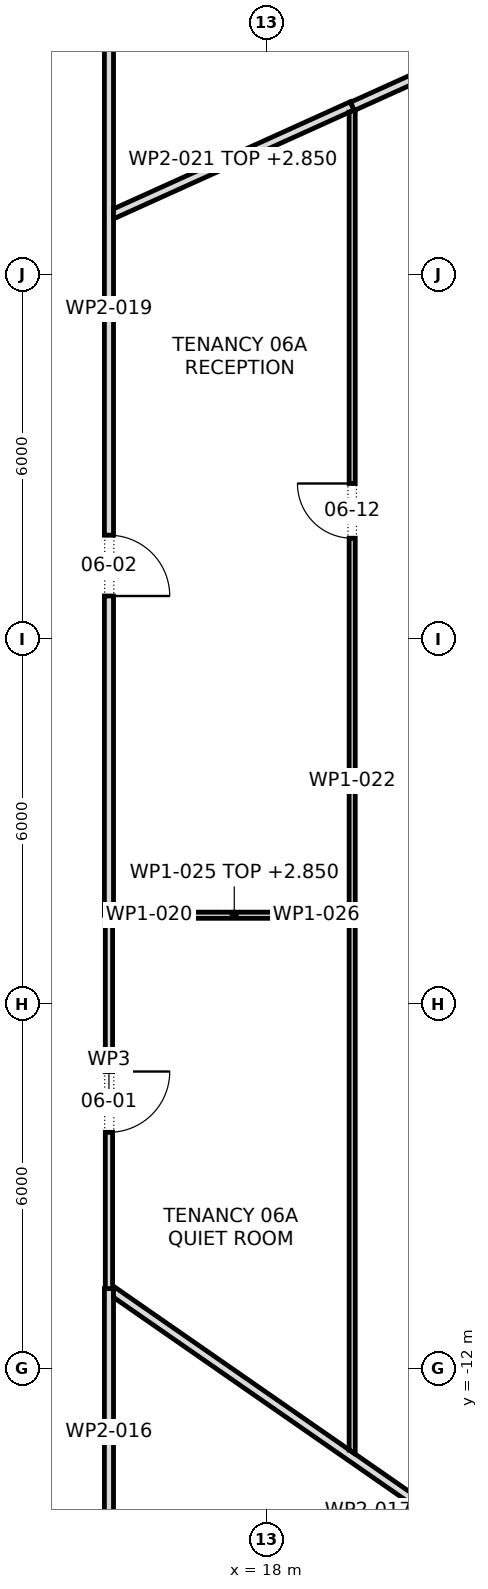
"""IFC4 building model, lengths in metres.
Left out: names, types, materials, properties, quantities, classifications, styles, units other than length and angle.
Written with IfcOpenShell. Run it as: python <this file> out.ifc"""

import sys

from ifc_helpers import new_model, si_unit, direction, frame, frame_2d, origin, place, context, subcontext, project, spatial, polyline, rectangle, outline, extrude, element, fill, save


model = new_model("IFC4")
c1 = context("Model", 3, precision=1e-05, world=origin(), true_north=direction((0.0, 1.0)))
c2 = subcontext(c1, "Body", "Model", "MODEL_VIEW")
j1 = project(units=[si_unit("LENGTHUNIT", "METRE"), si_unit("PLANEANGLEUNIT", "RADIAN")], contexts=[c1])
p1 = place(None, origin())
s1 = spatial("IfcSite", under=j1, at=p1, CompositionType="ELEMENT")
p2 = place(p1, origin())
s2 = spatial("IfcBuilding", under=s1, at=p2, CompositionType="ELEMENT")
p3 = place(p2, frame((0.0, 0.0, 86.5)))
s3 = spatial("IfcBuildingStorey", under=s2, at=p3, CompositionType="ELEMENT", Elevation=86.5)
p4 = place(p3, frame((15.4, -10.68, 0.0), z_axis=(0.0, 0.0, 1.0), x_axis=(0.0, -1.0, 0.0)))
e1 = element("IfcWall", 1, at=p4, inside=s3, PredefinedType="PARTITIONING", context=c2, shape_type="SweptSolid", body=[
    extrude(outline(polyline([(0.0, -0.075), (1.548, -0.075), (3.097, -0.075), (4.645, -0.075), (4.795, 0.075), (3.197, 0.075), (1.598, 0.075), (0.0, 0.075), (0.0, -0.075)])), origin(), (0.0, 0.0, 1.0), 3.9),
])
p5 = place(p3, frame((15.418, -10.692, 0.0), z_axis=(0.0, 0.0, 1.0), x_axis=(0.821423906774, -0.57031812647, 0.0)))
e2 = element("IfcWall", 2, at=p5, inside=s3, PredefinedType="PARTITIONING", context=c2, shape_type="SweptSolid", body=[
    extrude(outline(polyline([(0.122, -0.075), (1.922, -0.075), (3.722, -0.075), (5.522, -0.075), (7.322, -0.075), (9.122, -0.075), (10.922, -0.075), (12.722, -0.075), (12.722, -0.074), (12.722, 0.075), (10.727, 0.075), (8.732, 0.075), (6.737, 0.075), (4.741, 0.075), (4.737, 0.072), (4.735, 0.075), (3.157, 0.075), (1.578, 0.075), (0.0, 0.075), (0.0, 0.074), (0.028, 0.034), (0.04, 0.043), (0.122, -0.075)])), origin(), (0.0, 0.0, 1.0), 2.86),
])
p6 = place(p3, frame((15.4, -4.54, 0.0), z_axis=(0.0, 0.0, 1.0), x_axis=(0.0, -1.0, 0.0)))
e3 = element("IfcWall", 3, at=p6, inside=s3, PredefinedType="PARTITIONING", context=c2, shape_type="SweptSolid", body=[
    extrude(rectangle(XDim=6.14, YDim=0.12, at=frame_2d((3.07, 0.0))), origin(), (0.0, 0.0, 1.0), 3.9),
])
p7 = place(p6, frame((2.57, 0.0, 0.0)))
e4 = element("IfcOpeningElement", 4, at=p7, cuts=e3, PredefinedType="OPENING", context=c2, shape_type="SweptSolid", body=[
    extrude(rectangle(XDim=1.0, YDim=2.1, at=frame_2d((0.5, 1.05))), frame((0.0, 0.072, 0.0), z_axis=(0.0, -1.0, 0.0), x_axis=(1.0, 0.0, 0.0)), (0.0, 0.0, 1.0), 0.144),
])
p8 = place(p3, frame((15.4, -4.54, 0.0), z_axis=(0.0, 0.0, 1.0), x_axis=(0.0, 1.0, 0.0)))
e5 = element("IfcWall", 5, at=p8, inside=s3, PredefinedType="PARTITIONING", context=c2, shape_type="SweptSolid", body=[
    extrude(outline(polyline([(0.0, -0.075), (1.82, -0.075), (3.639, -0.075), (5.458, -0.075), (7.278, -0.075), (9.098, -0.075), (10.917, -0.075), (12.737, -0.075), (14.556, -0.075), (16.376, -0.075), (18.195, -0.075), (20.015, -0.075), (19.865, 0.075), (17.878, 0.075), (15.892, 0.075), (13.906, 0.075), (11.919, 0.075), (9.933, 0.075), (7.946, 0.075), (5.959, 0.075), (3.973, 0.075), (1.987, 0.075), (0.0, 0.075), (0.0, -0.075)])), origin(), (0.0, 0.0, 1.0), 3.9),
])
p9 = place(p8, frame((5.25, 0.0, 0.0)))
e6 = element("IfcOpeningElement", 6, at=p9, cuts=e5, PredefinedType="OPENING", context=c2, shape_type="SweptSolid", body=[
    extrude(rectangle(XDim=1.0, YDim=2.1, at=frame_2d((0.5, 1.05))), frame((0.0, 0.087, 0.0), z_axis=(0.0, -1.0, 0.0), x_axis=(1.0, 0.0, 0.0)), (0.0, 0.0, 1.0), 0.174),
])
p10 = place(p8, frame((15.22, 0.0, 0.0)))
e7 = element("IfcOpeningElement", 7, at=p10, cuts=e5, PredefinedType="OPENING", context=c2, shape_type="SweptSolid", body=[
    extrude(rectangle(XDim=1.0, YDim=2.1, at=frame_2d((0.5, 1.05))), frame((0.0, 0.087, 0.0), z_axis=(0.0, -1.0, 0.0), x_axis=(1.0, 0.0, 0.0)), (0.0, 0.0, 1.0), 0.174),
])
p11 = place(p3, frame((15.46, -4.54, 0.0), z_axis=(0.0, 0.0, 1.0), x_axis=(1.0, 0.0, 0.0)))
e8 = element("IfcWall", 8, at=p11, inside=s3, PredefinedType="PARTITIONING", context=c2, shape_type="SweptSolid", body=[
    extrude(outline(polyline([(1.192, 0.05), (0.015, 0.05), (0.015, 0.0), (0.0, 0.0), (0.0, -0.05), (1.192, -0.05), (1.192, 0.05)])), origin(), (0.0, 0.0, 1.0), 3.9),
])
p12 = place(p3, frame((15.444, 6.98, 0.0), z_axis=(0.0, 0.0, 1.0), x_axis=(0.911064178848, 0.412264553436, 0.0)))
e9 = element("IfcWall", 9, at=p12, inside=s3, PredefinedType="PARTITIONING", context=c2, shape_type="SweptSolid", body=[
    extrude(outline(polyline([(0.0, -0.075), (1.418, -0.075), (2.835, -0.075), (4.253, -0.075), (4.254, -0.073), (4.259, -0.075), (4.342, -0.075), (4.342, 0.075), (2.917, 0.075), (1.493, 0.075), (0.068, 0.075), (0.0, -0.075)])), origin(), (0.0, 0.0, 1.0), 2.85),
])
p13 = place(p3, frame((19.4, -13.4, 0.0), z_axis=(0.0, 0.0, 1.0), x_axis=(0.0, 1.0, 0.0)))
e10 = element("IfcWall", 10, at=p13, inside=s3, PredefinedType="PARTITIONING", context=c2, shape_type="SweptSolid", body=[
    extrude(outline(polyline([(22.1, -0.05), (22.1, -0.049), (22.094, -0.036), (22.1, -0.033), (22.1, -0.027), (22.065, 0.05), (20.186, 0.05), (18.307, 0.05), (16.427, 0.05), (14.548, 0.05), (12.669, 0.05), (10.79, 0.05), (8.91, 0.05), (8.91, 0.05), (8.81, 0.05), (8.81, 0.05), (7.062, 0.05), (5.314, 0.05), (3.566, 0.05), (1.817, 0.05), (0.069, 0.05), (0.0, -0.05), (0.0, -0.05), (1.842, -0.05), (3.683, -0.05), (5.525, -0.05), (7.367, -0.05), (9.208, -0.05), (11.05, -0.05), (12.892, -0.05), (14.734, -0.05), (16.575, -0.05), (18.417, -0.05), (20.259, -0.05), (22.1, -0.05)])), origin(), (0.0, 0.0, 1.0), 3.9),
])
p14 = place(p13, frame((15.061, 0.0, 0.0)))
e11 = element("IfcOpeningElement", 11, at=p14, cuts=e10, PredefinedType="OPENING", context=c2, shape_type="SweptSolid", body=[
    extrude(rectangle(XDim=0.9, YDim=2.1, at=frame_2d((0.45, 1.05))), frame((0.0, 0.062, 0.0), z_axis=(0.0, -1.0, 0.0), x_axis=(1.0, 0.0, 0.0)), (0.0, 0.0, 1.0), 0.124),
])
p15 = place(p3, frame((19.404, 8.762, 0.0), z_axis=(0.0, 0.0, 1.0), x_axis=(0.911089862884, 0.41220778953, 0.0)))
e12 = element("IfcWall", 12, at=p15, inside=s3, PredefinedType="PARTITIONING", context=c2, shape_type="SweptSolid", body=[
    extrude(outline(polyline([(11.121, -0.075), (11.121, -0.067), (11.119, -0.002), (11.099, 0.075), (9.25, 0.075), (7.4, 0.075), (5.55, 0.075), (3.7, 0.075), (1.85, 0.075), (0.0, 0.075), (0.0, -0.068), (0.015, -0.075), (1.866, -0.075), (3.717, -0.075), (5.568, -0.075), (7.419, -0.075), (9.27, -0.075), (11.121, -0.075)])), origin(), (0.0, 0.0, 1.0), 2.85),
])
p16 = place(p3, frame((16.652, -4.54, 0.0), z_axis=(0.0, 0.0, 1.0), x_axis=(1.0, 0.0, 0.0)))
e13 = element("IfcWall", 13, at=p16, inside=s3, PredefinedType="PARTITIONING", context=c2, shape_type="SweptSolid", body=[
    extrude(outline(polyline([(0.0, 0.05), (0.0, -0.05), (1.617, -0.05), (1.617, 0.05), (0.0, 0.05)])), origin(), (0.0, 0.0, 1.0), 2.85),
])
p17 = place(p3, frame((18.269, -4.54, 0.0), z_axis=(0.0, 0.0, 1.0), x_axis=(1.0, 0.0, 0.0)))
e14 = element("IfcWall", 14, at=p17, inside=s3, PredefinedType="PARTITIONING", context=c2, shape_type="SweptSolid", body=[
    extrude(outline(polyline([(0.0, -0.05), (1.081, -0.05), (1.081, 0.05), (0.0, 0.05), (0.0, -0.05)])), origin(), (0.0, 0.0, 1.0), 3.9),
])
p18 = place(p7, origin())
e15 = element("IfcDoor", 15, at=p18, inside=s3, OperationType="SINGLE_SWING_RIGHT", PredefinedType="DOOR", context=c2, shape_type="SweptSolid", body=[
    extrude(rectangle(XDim=1.0, YDim=2.1, at=frame_2d((0.5, 1.05))), frame((0.0, 0.025, 0.0), z_axis=(0.0, -1.0, 0.0), x_axis=(1.0, 0.0, 0.0)), (0.0, 0.0, 1.0), 0.05),
])
fill(e4, e15)
p19 = place(p9, frame((1.0, 0.0, 0.0), z_axis=(0.0, 0.0, 1.0), x_axis=(-1.0, 0.0, 0.0)))
e16 = element("IfcDoor", 16, at=p19, inside=s3, OperationType="SINGLE_SWING_LEFT", PredefinedType="DOOR", context=c2, shape_type="SweptSolid", body=[
    extrude(rectangle(XDim=1.0, YDim=2.1, at=frame_2d((0.5, 1.05))), frame((0.0, 0.025, 0.0), z_axis=(0.0, -1.0, 0.0), x_axis=(1.0, 0.0, 0.0)), (0.0, 0.0, 1.0), 0.05),
])
fill(e6, e16)
p20 = place(p14, origin())
e17 = element("IfcDoor", 17, at=p20, inside=s3, OperationType="SINGLE_SWING_LEFT", PredefinedType="DOOR", context=c2, shape_type="SweptSolid", body=[
    extrude(rectangle(XDim=0.9, YDim=2.1, at=frame_2d((0.45, 1.05))), frame((0.0, 0.025, 0.0), z_axis=(0.0, -1.0, 0.0), x_axis=(1.0, 0.0, 0.0)), (0.0, 0.0, 1.0), 0.05),
])
fill(e11, e17)
save(model, sys.argv[1])
